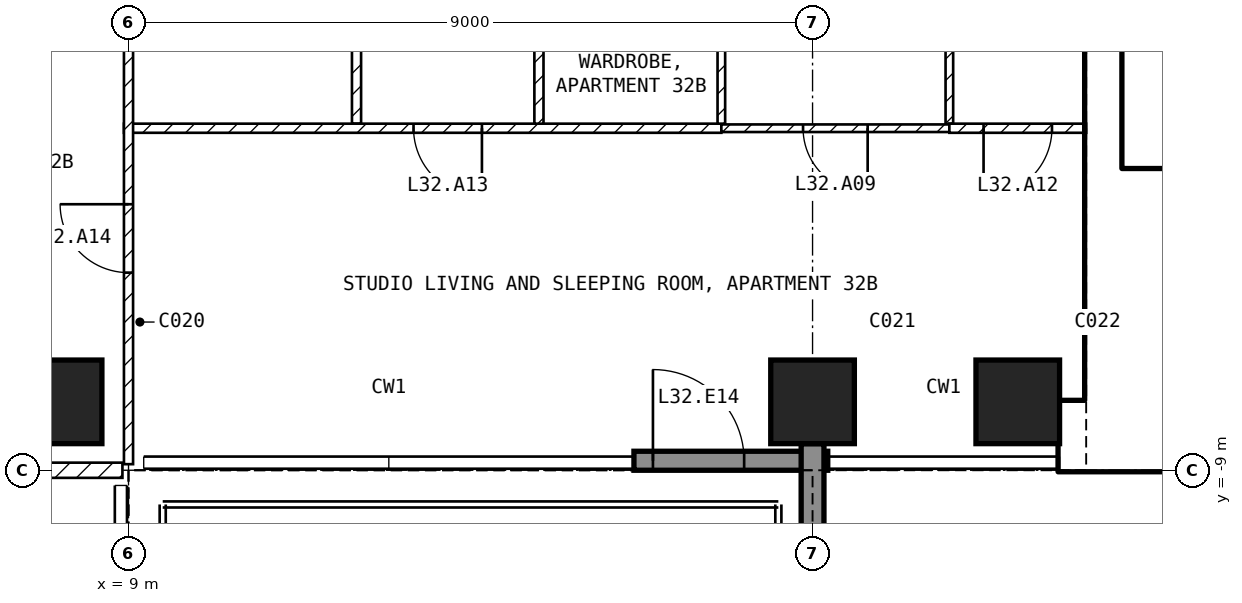
"""IFC4 building model, lengths in metres.
Left out: names, types, materials, properties, quantities, classifications, styles, units other than length and angle.
Written with IfcOpenShell. Run it as: python <this file> out.ifc"""

import sys

from ifc_helpers import new_model, si_unit, direction, frame, frame_2d, origin, origin_2d, place, context, subcontext, project, spatial, rectangle, extrude, element, fill, save


model = new_model("IFC4")
c1 = context("Model", 3, precision=1e-05, world=origin(), true_north=direction((0.0, 1.0)))
c2 = subcontext(c1, "Body", "Model", "MODEL_VIEW")
j1 = project(units=[si_unit("LENGTHUNIT", "METRE"), si_unit("PLANEANGLEUNIT", "RADIAN")], contexts=[c1])
p1 = place(None, origin())
s1 = spatial("IfcSite", under=j1, at=p1, CompositionType="ELEMENT")
p2 = place(p1, origin())
s2 = spatial("IfcBuilding", under=s1, at=p2, CompositionType="ELEMENT")
p3 = place(p2, frame((0.0, 0.0, 133.9)))
s3 = spatial("IfcBuildingStorey", under=s2, at=p3, CompositionType="ELEMENT", Elevation=133.9)
for number, where, z_axis, x_axis in (
    (1, (8.1, -8.1, -0.25), (0.0, 0.0, 1.0), (1.0, 0.0, 0.0)),
    (2, (18.0, -8.1, -0.25), (0.0, 0.0, 1.0), (1.0, 0.0, 0.0)),
    (3, (20.7, -8.1, -0.25), (0.0, 0.0, 1.0), (1.0, 0.0, 0.0)),
):
    element("IfcColumn", number, at=place(p3, frame(where, z_axis=z_axis, x_axis=x_axis)), inside=s3, PredefinedType="COLUMN", context=c2, shape_type="SweptSolid", body=[
        extrude(rectangle(XDim=1.1, YDim=1.1, at=origin_2d()), origin(), (0.0, 0.0, 1.0), 3.5),
    ])
p4 = place(p3, frame((15.65, -8.875, 0.0), z_axis=(0.0, 0.0, 1.0), x_axis=(1.0, 0.0, 0.0)))
e4 = element("IfcWall", 4, at=p4, inside=s3, PredefinedType="SOLIDWALL", context=c2, shape_type="SweptSolid", body=[
    extrude(rectangle(XDim=2.55, YDim=0.25, at=frame_2d((1.275, 0.0))), origin(), (0.0, 0.0, 1.0), 3.25),
])
p5 = place(p4, frame((0.25, 0.0, 0.0)))
e5 = element("IfcOpeningElement", 5, at=p5, cuts=e4, PredefinedType="OPENING", context=c2, shape_type="SweptSolid", body=[
    extrude(rectangle(XDim=1.2, YDim=2.4, at=frame_2d((0.6, 1.2))), frame((0.0, 0.135, 0.0), z_axis=(0.0, -1.0, 0.0), x_axis=(1.0, 0.0, 0.0)), (0.0, 0.0, 1.0), 0.27),
])
p6 = place(p3, frame((18.0, -8.65, 0.0), z_axis=(0.0, 0.0, 1.0), x_axis=(0.0, -1.0, 0.0)))
e6 = element("IfcWall", 6, at=p6, inside=s3, PredefinedType="SOLIDWALL", context=c2, shape_type="SweptSolid", body=[
    extrude(rectangle(XDim=3.09, YDim=0.3, at=frame_2d((1.545, 0.0))), origin(), (0.0, 0.0, 1.0), 3.25),
])
p7 = place(p3, frame((21.25, -8.55, 0.0), z_axis=(0.0, 0.0, 1.0), x_axis=(1.0, 0.0, 0.0)))
e7 = element("IfcWall", 7, at=p7, inside=s3, PredefinedType="SHEAR", context=c2, shape_type="SweptSolid", body=[
    extrude(rectangle(XDim=8.95, YDim=0.9, at=frame_2d((4.475, 0.0))), origin(), (0.0, 0.0, 1.0), 3.25),
])
p8 = place(p3, frame((21.825, -8.1, 0.0), z_axis=(0.0, 0.0, 1.0), x_axis=(0.0, 1.0, 0.0)))
e8 = element("IfcWall", 8, at=p8, inside=s3, PredefinedType="SHEAR", context=c2, shape_type="SweptSolid", body=[
    extrude(rectangle(XDim=6.9, YDim=0.45, at=frame_2d((3.45, 0.0))), origin(), (0.0, 0.0, 1.0), 3.25),
])
p9 = place(p3, frame((22.05, -5.15, 0.0), z_axis=(0.0, 0.0, 1.0), x_axis=(1.0, 0.0, 0.0)))
e9 = element("IfcWall", 9, at=p9, inside=s3, PredefinedType="SOLIDWALL", context=c2, shape_type="SweptSolid", body=[
    extrude(rectangle(XDim=6.3, YDim=0.2, at=frame_2d((3.15, 0.0))), origin(), (0.0, 0.0, 1.0), 3.25),
])
p10 = place(p9, frame((0.2, 0.0, 0.0)))
e10 = element("IfcOpeningElement", 10, at=p10, cuts=e9, PredefinedType="OPENING", context=c2, shape_type="SweptSolid", body=[
    extrude(rectangle(XDim=1.0, YDim=2.1, at=frame_2d((0.5, 1.05))), frame((0.0, 0.11, 0.0), z_axis=(0.0, -1.0, 0.0), x_axis=(1.0, 0.0, 0.0)), (0.0, 0.0, 1.0), 0.22),
])
p11 = place(p3, frame((8.92, -9.0, 0.0), z_axis=(0.0, 0.0, 1.0), x_axis=(-1.0, 0.0, 0.0)))
e11 = element("IfcWall", 11, at=p11, inside=s3, PredefinedType="PARTITIONING", context=c2, shape_type="SweptSolid", body=[
    extrude(rectangle(XDim=17.84, YDim=0.2, at=frame_2d((8.92, 0.0))), origin(), (0.0, 0.0, 1.0), 3.25),
])
p12 = place(p11, frame((8.42, 0.0, 0.0)))
e12 = element("IfcOpeningElement", 12, at=p12, cuts=e11, PredefinedType="OPENING", context=c2, shape_type="SweptSolid", body=[
    extrude(rectangle(XDim=1.0, YDim=2.1, at=frame_2d((0.5, 1.05))), frame((0.0, 0.11, 0.0), z_axis=(0.0, -1.0, 0.0), x_axis=(1.0, 0.0, 0.0)), (0.0, 0.0, 1.0), 0.22),
])
p13 = place(p3, frame((12.0, -1.3, 0.0), z_axis=(0.0, 0.0, 1.0), x_axis=(0.0, -1.0, 0.0)))
e13 = element("IfcWall", 13, at=p13, inside=s3, PredefinedType="PARTITIONING", context=c2, shape_type="SweptSolid", body=[
    extrude(rectangle(XDim=3.14, YDim=0.12, at=frame_2d((1.57, 0.0))), origin(), (0.0, 0.0, 1.0), 3.25),
])
p14 = place(p13, frame((1.12, 0.0, 0.0)))
e14 = element("IfcOpeningElement", 14, at=p14, cuts=e13, PredefinedType="OPENING", context=c2, shape_type="SweptSolid", body=[
    extrude(rectangle(XDim=0.9, YDim=2.1, at=frame_2d((0.45, 1.05))), frame((0.0, 0.07, 0.0), z_axis=(0.0, -1.0, 0.0), x_axis=(1.0, 0.0, 0.0)), (0.0, 0.0, 1.0), 0.14),
])
p15 = place(p3, frame((16.8, -4.5, 0.0), z_axis=(0.0, 0.0, 1.0), x_axis=(-1.0, 0.0, 0.0)))
e15 = element("IfcWall", 15, at=p15, inside=s3, PredefinedType="PARTITIONING", context=c2, shape_type="SweptSolid", body=[
    extrude(rectangle(XDim=7.86, YDim=0.12, at=frame_2d((3.93, 0.0))), origin(), (0.0, 0.0, 1.0), 3.25),
])
p16 = place(p15, frame((3.15, 0.0, 0.0)))
e16 = element("IfcOpeningElement", 16, at=p16, cuts=e15, PredefinedType="OPENING", context=c2, shape_type="SweptSolid", body=[
    extrude(rectangle(XDim=0.9, YDim=2.1, at=frame_2d((0.45, 1.05))), frame((0.0, 0.07, 0.0), z_axis=(0.0, -1.0, 0.0), x_axis=(1.0, 0.0, 0.0)), (0.0, 0.0, 1.0), 0.14),
])
p17 = place(p3, frame((9.0, -8.92, 0.0), z_axis=(0.0, 0.0, 1.0), x_axis=(0.0, 1.0, 0.0)))
e17 = element("IfcWall", 17, at=p17, inside=s3, PredefinedType="PARTITIONING", context=c2, shape_type="SweptSolid", body=[
    extrude(rectangle(XDim=7.62, YDim=0.12, at=frame_2d((3.81, 0.0))), origin(), (0.0, 0.0, 1.0), 3.25),
])
p18 = place(p17, frame((2.52, 0.0, 0.0)))
e18 = element("IfcOpeningElement", 18, at=p18, cuts=e17, PredefinedType="OPENING", context=c2, shape_type="SweptSolid", body=[
    extrude(rectangle(XDim=0.9, YDim=2.1, at=frame_2d((0.45, 1.05))), frame((0.0, 0.07, 0.0), z_axis=(0.0, -1.0, 0.0), x_axis=(1.0, 0.0, 0.0)), (0.0, 0.0, 1.0), 0.14),
])
p19 = place(p3, frame((14.4, -1.3, 0.0), z_axis=(0.0, 0.0, 1.0), x_axis=(0.0, -1.0, 0.0)))
e19 = element("IfcWall", 19, at=p19, inside=s3, PredefinedType="PARTITIONING", context=c2, shape_type="SweptSolid", body=[
    extrude(rectangle(XDim=3.14, YDim=0.12, at=frame_2d((1.57, 0.0))), origin(), (0.0, 0.0, 1.0), 3.25),
])
p20 = place(p19, frame((1.12, 0.0, 0.0)))
e20 = element("IfcOpeningElement", 20, at=p20, cuts=e19, PredefinedType="OPENING", context=c2, shape_type="SweptSolid", body=[
    extrude(rectangle(XDim=0.9, YDim=2.1, at=frame_2d((0.45, 1.05))), frame((0.0, 0.07, 0.0), z_axis=(0.0, -1.0, 0.0), x_axis=(1.0, 0.0, 0.0)), (0.0, 0.0, 1.0), 0.14),
])
for number, where, z_axis, x_axis in (
    (21, (16.8, -1.3, 0.0), (0.0, 0.0, 1.0), (0.0, -1.0, 0.0)),
    (22, (19.8, -1.3, 0.0), (0.0, 0.0, 1.0), (0.0, -1.0, 0.0)),
):
    element("IfcWall", number, at=place(p3, frame(where, z_axis=z_axis, x_axis=x_axis)), inside=s3, PredefinedType="PARTITIONING", context=c2, shape_type="SweptSolid", body=[
        extrude(rectangle(XDim=3.14, YDim=0.1, at=frame_2d((1.57, 0.0))), origin(), (0.0, 0.0, 1.0), 3.25),
    ])
p21 = place(p3, frame((19.8, -4.5, 0.0), z_axis=(0.0, 0.0, 1.0), x_axis=(-1.0, 0.0, 0.0)))
e23 = element("IfcWall", 23, at=p21, inside=s3, PredefinedType="PARTITIONING", context=c2, shape_type="SweptSolid", body=[
    extrude(rectangle(XDim=3.0, YDim=0.1, at=frame_2d((1.5, 0.0))), origin(), (0.0, 0.0, 1.0), 3.25),
])
p22 = place(p21, frame((1.075, 0.0, 0.0)))
e24 = element("IfcOpeningElement", 24, at=p22, cuts=e23, PredefinedType="OPENING", context=c2, shape_type="SweptSolid", body=[
    extrude(rectangle(XDim=0.85, YDim=2.1, at=frame_2d((0.425, 1.05))), frame((0.0, 0.06, 0.0), z_axis=(0.0, -1.0, 0.0), x_axis=(1.0, 0.0, 0.0)), (0.0, 0.0, 1.0), 0.12),
])
p23 = place(p3, frame((21.6, -4.5, 0.0), z_axis=(0.0, 0.0, 1.0), x_axis=(-1.0, 0.0, 0.0)))
e25 = element("IfcWall", 25, at=p23, inside=s3, PredefinedType="PARTITIONING", context=c2, shape_type="SweptSolid", body=[
    extrude(rectangle(XDim=1.8, YDim=0.12, at=frame_2d((0.9, 0.0))), origin(), (0.0, 0.0, 1.0), 3.25),
])
p24 = place(p23, frame((0.45, 0.0, 0.0)))
e26 = element("IfcOpeningElement", 26, at=p24, cuts=e25, PredefinedType="OPENING", context=c2, shape_type="SweptSolid", body=[
    extrude(rectangle(XDim=0.9, YDim=2.1, at=frame_2d((0.45, 1.05))), frame((0.0, 0.07, 0.0), z_axis=(0.0, -1.0, 0.0), x_axis=(1.0, 0.0, 0.0)), (0.0, 0.0, 1.0), 0.14),
])
p25 = place(p5, origin())
e27 = element("IfcDoor", 27, at=p25, inside=s3, OperationType="SINGLE_SWING_LEFT", PredefinedType="DOOR", context=c2, shape_type="SweptSolid", body=[
    extrude(rectangle(XDim=1.2, YDim=2.4, at=frame_2d((0.6, 1.2))), frame((0.0, 0.025, 0.0), z_axis=(0.0, -1.0, 0.0), x_axis=(1.0, 0.0, 0.0)), (0.0, 0.0, 1.0), 0.05),
])
fill(e5, e27)
p26 = place(p10, origin())
e28 = element("IfcDoor", 28, at=p26, inside=s3, OperationType="SINGLE_SWING_LEFT", PredefinedType="DOOR", context=c2, shape_type="SweptSolid", body=[
    extrude(rectangle(XDim=1.0, YDim=2.1, at=frame_2d((0.5, 1.05))), frame((0.0, 0.025, 0.0), z_axis=(0.0, -1.0, 0.0), x_axis=(1.0, 0.0, 0.0)), (0.0, 0.0, 1.0), 0.05),
])
fill(e10, e28)
p27 = place(p22, origin())
e29 = element("IfcDoor", 29, at=p27, inside=s3, OperationType="SINGLE_SWING_LEFT", PredefinedType="DOOR", context=c2, shape_type="SweptSolid", body=[
    extrude(rectangle(XDim=0.85, YDim=2.1, at=frame_2d((0.425, 1.05))), frame((0.0, 0.025, 0.0), z_axis=(0.0, -1.0, 0.0), x_axis=(1.0, 0.0, 0.0)), (0.0, 0.0, 1.0), 0.05),
])
fill(e24, e29)
p28 = place(p24, origin())
e30 = element("IfcDoor", 30, at=p28, inside=s3, OperationType="SINGLE_SWING_RIGHT", PredefinedType="DOOR", context=c2, shape_type="SweptSolid", body=[
    extrude(rectangle(XDim=0.9, YDim=2.1, at=frame_2d((0.45, 1.05))), frame((0.0, 0.025, 0.0), z_axis=(0.0, -1.0, 0.0), x_axis=(1.0, 0.0, 0.0)), (0.0, 0.0, 1.0), 0.05),
])
fill(e26, e30)
p29 = place(p16, origin())
e31 = element("IfcDoor", 31, at=p29, inside=s3, OperationType="SINGLE_SWING_LEFT", PredefinedType="DOOR", context=c2, shape_type="SweptSolid", body=[
    extrude(rectangle(XDim=0.9, YDim=2.1, at=frame_2d((0.45, 1.05))), frame((0.0, 0.025, 0.0), z_axis=(0.0, -1.0, 0.0), x_axis=(1.0, 0.0, 0.0)), (0.0, 0.0, 1.0), 0.05),
])
fill(e16, e31)
p30 = place(p18, origin())
e32 = element("IfcDoor", 32, at=p30, inside=s3, OperationType="SINGLE_SWING_RIGHT", PredefinedType="DOOR", context=c2, shape_type="SweptSolid", body=[
    extrude(rectangle(XDim=0.9, YDim=2.1, at=frame_2d((0.45, 1.05))), frame((0.0, 0.025, 0.0), z_axis=(0.0, -1.0, 0.0), x_axis=(1.0, 0.0, 0.0)), (0.0, 0.0, 1.0), 0.05),
])
fill(e18, e32)
save(model, sys.argv[1])
